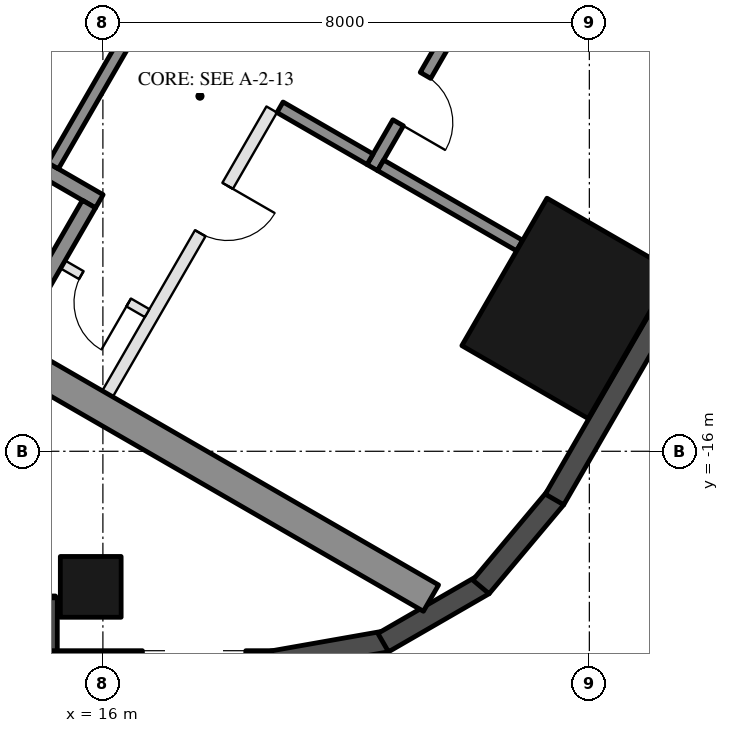
"""IFC4 building model, lengths in metres.
Left out: names, types, materials, properties, quantities, classifications, styles, units other than length and angle.
Written with IfcOpenShell. Run it as: python <this file> out.ifc"""

import sys

from ifc_helpers import new_model, si_unit, direction, frame, frame_2d, origin, origin_2d, place, context, subcontext, project, spatial, rectangle, hollow_rectangle, extrude, element, fill, save


model = new_model("IFC4")
c1 = context("Model", 3, precision=1e-05, world=origin(), true_north=direction((0.0, 1.0)))
c2 = subcontext(c1, "Body", "Model", "MODEL_VIEW")
j1 = project(units=[si_unit("LENGTHUNIT", "METRE"), si_unit("PLANEANGLEUNIT", "RADIAN")], contexts=[c1])
p1 = place(None, origin())
s1 = spatial("IfcSite", under=j1, at=p1, CompositionType="ELEMENT")
p2 = place(p1, origin())
s2 = spatial("IfcBuilding", under=s1, at=p2, CompositionType="ELEMENT")
p3 = place(p2, frame((0.0, 0.0, 68.7)))
s3 = spatial("IfcBuildingStorey", under=s2, at=p3, CompositionType="ELEMENT", Elevation=68.7)
p4 = place(p3, frame((15.8, -18.23, 0.0), z_axis=(0.0, 0.0, 1.0), x_axis=(-1.0, 0.0, 0.0)))
e1 = element("IfcColumn", 1, at=p4, inside=s3, PredefinedType="COLUMN", context=c2, shape_type="SweptSolid", body=[
    extrude(hollow_rectangle(XDim=1.0, YDim=1.0, WallThickness=0.045, at=origin_2d()), origin(), (0.0, 0.0, 1.0), 3.7),
])
p5 = place(p3, frame((23.643, -13.65, 0.0), z_axis=(0.0, 0.0, 1.0), x_axis=(0.5, 0.866025403784, 0.0)))
e2 = element("IfcColumn", 2, at=p5, inside=s3, PredefinedType="COLUMN", context=c2, shape_type="SweptSolid", body=[
    extrude(hollow_rectangle(XDim=2.8, YDim=2.4, WallThickness=0.07, at=origin_2d()), origin(), (0.0, 0.0, 1.0), 3.7),
])
p6 = place(p3, frame((8.48, -18.555, 0.0), z_axis=(0.0, 0.0, 1.0), x_axis=(1.0, 0.0, 0.0)))
e3 = element("IfcWall", 3, at=p6, inside=s3, PredefinedType="SOLIDWALL", context=c2, shape_type="SweptSolid", body=[
    extrude(rectangle(XDim=6.74, YDim=0.35, at=frame_2d((3.37, 0.0))), origin(), (0.0, 0.0, 1.0), 3.55),
])
p7 = place(p6, frame((3.57, 0.0, 0.0)))
e4 = element("IfcOpeningElement", 4, at=p7, cuts=e3, PredefinedType="OPENING", context=c2, shape_type="SweptSolid", body=[
    extrude(rectangle(XDim=2.4, YDim=2.4, at=frame_2d((1.2, 1.2))), frame((0.0, 0.185, 0.0), z_axis=(0.0, -1.0, 0.0), x_axis=(1.0, 0.0, 0.0)), (0.0, 0.0, 1.0), 0.37),
])
p8 = place(p6, frame((0.77, 0.0, 0.3)))
e5 = element("IfcOpeningElement", 5, at=p8, cuts=e3, PredefinedType="OPENING", context=c2, shape_type="SweptSolid", body=[
    extrude(rectangle(XDim=2.5, YDim=2.65, at=frame_2d((1.25, 1.325))), frame((0.0, 0.185, 0.0), z_axis=(0.0, -1.0, 0.0), x_axis=(1.0, 0.0, 0.0)), (0.0, 0.0, 1.0), 0.37),
])
p9 = place(p3, frame((15.075, -18.41, 0.0), z_axis=(0.0, 0.0, 1.0), x_axis=(0.0, -1.0, 0.0)))
e6 = element("IfcWall", 6, at=p9, inside=s3, PredefinedType="SOLIDWALL", context=c2, shape_type="SweptSolid", body=[
    extrude(rectangle(XDim=1.22, YDim=0.35, at=frame_2d((0.61, 0.0))), origin(), (0.0, 0.0, 1.0), 3.55),
])
p10 = place(p3, frame((14.9, -19.455, 0.0), z_axis=(0.0, 0.0, 1.0), x_axis=(1.0, 0.0, 0.0)))
e7 = element("IfcWall", 7, at=p10, inside=s3, PredefinedType="SOLIDWALL", context=c2, shape_type="SweptSolid", body=[
    extrude(rectangle(XDim=3.916, YDim=0.35, at=frame_2d((1.958, 0.0))), origin(), (0.0, 0.0, 1.0), 3.55),
])
p11 = place(p10, frame((1.75, 0.0, 0.3)))
e8 = element("IfcOpeningElement", 8, at=p11, cuts=e7, PredefinedType="OPENING", context=c2, shape_type="SweptSolid", body=[
    extrude(rectangle(XDim=1.7, YDim=2.65, at=frame_2d((0.85, 1.325))), frame((0.0, 0.185, 0.0), z_axis=(0.0, -1.0, 0.0), x_axis=(1.0, 0.0, 0.0)), (0.0, 0.0, 1.0), 0.37),
])
p12 = place(p3, frame((18.785, -19.458, 0.0), z_axis=(0.0, 0.0, 1.0), x_axis=(0.984798995425, 0.173697837091, 0.0)))
e9 = element("IfcWall", 9, at=p12, inside=s3, PredefinedType="SOLIDWALL", context=c2, shape_type="SweptSolid", body=[
    extrude(rectangle(XDim=1.91, YDim=0.35, at=frame_2d((0.955, 0.0))), origin(), (0.0, 0.0, 1.0), 3.55),
])
for number, where, z_axis, x_axis in (
    (10, (20.61, -19.147, 0.0), (0.0, 0.0, 1.0), (0.866, 0.5, 0.0)),
    (11, (22.217, -18.231, 0.0), (0.0, 0.0, 1.0), (0.643, 0.766, 0.0)),
):
    element("IfcWall", number, at=place(p3, frame(where, z_axis=z_axis, x_axis=x_axis)), inside=s3, PredefinedType="SOLIDWALL", context=c2, shape_type="SweptSolid", body=[
        extrude(rectangle(XDim=1.91, YDim=0.35, at=frame_2d((0.955, 0.0))), origin(), (0.0, 0.0, 1.0), 3.55),
    ])
p13 = place(p3, frame((23.427, -16.792, 0.0), z_axis=(0.0, 0.0, 1.0), x_axis=(0.500018773155, 0.866014564827, 0.0)))
e12 = element("IfcWall", 12, at=p13, inside=s3, PredefinedType="SOLIDWALL", context=c2, shape_type="SweptSolid", body=[
    extrude(rectangle(XDim=5.658, YDim=0.35, at=frame_2d((2.829, 0.0))), origin(), (0.0, 0.0, 1.0), 3.55),
])
for number, where, z_axis, x_axis in (
    (13, (8.547, -10.997, 0.0), (0.0, 0.0, 1.0), (0.866, -0.5, 0.0)),
    (14, (13.797, -1.903, 0.0), (0.0, 0.0, 1.0), (0.866, -0.5, 0.0)),
):
    element("IfcWall", number, at=place(p3, frame(where, z_axis=z_axis, x_axis=x_axis)), inside=s3, PredefinedType="SHEAR", context=c2, shape_type="SweptSolid", body=[
        extrude(rectangle(XDim=14.837, YDim=0.5, at=frame_2d((7.418, 0.0))), origin(), (0.0, 0.0, 1.0), 3.5),
    ])
p14 = place(p3, frame((10.356, -8.664, 0.0), z_axis=(0.0, 0.0, 1.0), x_axis=(0.866028629588, -0.499994412703, 0.0)))
e15 = element("IfcWall", 15, at=p14, inside=s3, PredefinedType="SHEAR", context=c2, shape_type="SweptSolid", body=[
    extrude(rectangle(XDim=6.45, YDim=0.25, at=frame_2d((3.225, 0.0))), origin(), (0.0, 0.0, 1.0), 3.5),
])
p15 = place(p14, frame((0.3, 0.0, 0.0)))
e16 = element("IfcOpeningElement", 16, at=p15, cuts=e15, PredefinedType="OPENING", context=c2, shape_type="SweptSolid", body=[
    extrude(rectangle(XDim=1.0, YDim=2.1, at=frame_2d((0.5, 1.05))), frame((0.0, 0.135, 0.0), z_axis=(0.0, -1.0, 0.0), x_axis=(1.0, 0.0, 0.0)), (0.0, 0.0, 1.0), 0.27),
])
p16 = place(p3, frame((14.496, -14.143, 0.0), z_axis=(0.0, 0.0, 1.0), x_axis=(0.500062241894, 0.865989465428, 0.0)))
e17 = element("IfcWall", 17, at=p16, inside=s3, PredefinedType="SHEAR", context=c2, shape_type="SweptSolid", body=[
    extrude(rectangle(XDim=2.55, YDim=0.25, at=frame_2d((1.275, 0.0))), origin(), (0.0, 0.0, 1.0), 3.5),
])
p17 = place(p3, frame((15.181, -11.305, 0.0), z_axis=(0.0, 0.0, 1.0), x_axis=(0.49994636267, 0.866056369097, 0.0)))
e18 = element("IfcWall", 18, at=p17, inside=s3, PredefinedType="SHEAR", context=c2, shape_type="SweptSolid", body=[
    extrude(rectangle(XDim=2.8, YDim=0.2, at=frame_2d((1.4, 0.0))), origin(), (0.0, 0.0, 1.0), 3.5),
])
p18 = place(p3, frame((20.43, -11.333, 0.0), z_axis=(0.0, 0.0, 1.0), x_axis=(0.500001309137, 0.866024647952, 0.0)))
e19 = element("IfcWall", 19, at=p18, inside=s3, PredefinedType="SHEAR", context=c2, shape_type="SweptSolid", body=[
    extrude(rectangle(XDim=2.4, YDim=0.2, at=frame_2d((1.2, 0.0))), origin(), (0.0, 0.0, 1.0), 3.5),
])
p19 = place(p18, frame((0.85, 0.0, 0.0)))
e20 = element("IfcOpeningElement", 20, at=p19, cuts=e19, PredefinedType="OPENING", context=c2, shape_type="SweptSolid", body=[
    extrude(rectangle(XDim=0.9, YDim=2.1, at=frame_2d((0.45, 1.05))), frame((0.0, 0.11, 0.0), z_axis=(0.0, -1.0, 0.0), x_axis=(1.0, 0.0, 0.0)), (0.0, 0.0, 1.0), 0.22),
])
p20 = place(p3, frame((18.913, -10.342, 0.0), z_axis=(0.0, 0.0, 1.0), x_axis=(0.866038183914, -0.499977863513, 0.0)))
e21 = element("IfcWall", 21, at=p20, inside=s3, PredefinedType="SHEAR", context=c2, shape_type="SweptSolid", body=[
    extrude(rectangle(XDim=1.71, YDim=0.2, at=frame_2d((0.855, 0.0))), origin(), (0.0, 0.0, 1.0), 3.5),
])
p21 = place(p3, frame((20.567, -11.297, 0.0), z_axis=(0.0, 0.0, 1.0), x_axis=(0.866060851709, -0.499938597367, 0.0)))
e22 = element("IfcWall", 22, at=p21, inside=s3, PredefinedType="SHEAR", context=c2, shape_type="SweptSolid", body=[
    extrude(rectangle(XDim=2.64, YDim=0.2, at=frame_2d((1.32, 0.0))), origin(), (0.0, 0.0, 1.0), 3.5),
])
p22 = place(p3, frame((16.076, -15.055, 0.0), z_axis=(0.0, 0.0, 1.0), x_axis=(0.499995103361, 0.866028230842, 0.0)))
e23 = element("IfcWall", 23, at=p22, inside=s3, PredefinedType="PARTITIONING", context=c2, shape_type="SweptSolid", body=[
    extrude(rectangle(XDim=5.4, YDim=0.2, at=frame_2d((2.7, 0.0))), origin(), (0.0, 0.0, 1.0), 3.5),
])
p23 = place(p22, frame((3.05, 0.0, 0.0)))
e24 = element("IfcOpeningElement", 24, at=p23, cuts=e23, PredefinedType="OPENING", context=c2, shape_type="SweptSolid", body=[
    extrude(rectangle(XDim=0.9, YDim=2.1, at=frame_2d((0.45, 1.05))), frame((0.0, 0.11, 0.0), z_axis=(0.0, -1.0, 0.0), x_axis=(1.0, 0.0, 0.0)), (0.0, 0.0, 1.0), 0.22),
])
p24 = place(p3, frame((15.342, -12.928, 0.0), z_axis=(0.0, 0.0, 1.0), x_axis=(0.865989903783, -0.500061482766, 0.0)))
e25 = element("IfcWall", 25, at=p24, inside=s3, PredefinedType="PARTITIONING", context=c2, shape_type="SweptSolid", body=[
    extrude(rectangle(XDim=1.6, YDim=0.15, at=frame_2d((0.8, 0.0))), origin(), (0.0, 0.0, 1.0), 3.5),
])
p25 = place(p24, frame((0.35, 0.0, 0.0)))
e26 = element("IfcOpeningElement", 26, at=p25, cuts=e25, PredefinedType="OPENING", context=c2, shape_type="SweptSolid", body=[
    extrude(rectangle(XDim=0.9, YDim=2.1, at=frame_2d((0.45, 1.05))), frame((0.0, 0.085, 0.0), z_axis=(0.0, -1.0, 0.0), x_axis=(1.0, 0.0, 0.0)), (0.0, 0.0, 1.0), 0.17),
])
p26 = place(p25, frame((0.9, 0.0, 0.0), z_axis=(0.0, 0.0, 1.0), x_axis=(-1.0, 0.0, 0.0)))
e27 = element("IfcDoor", 27, at=p26, inside=s3, OperationType="SINGLE_SWING_LEFT", PredefinedType="DOOR", context=c2, shape_type="SweptSolid", body=[
    extrude(rectangle(XDim=0.9, YDim=2.1, at=frame_2d((0.45, 1.05))), frame((0.0, 0.025, 0.0), z_axis=(0.0, -1.0, 0.0), x_axis=(1.0, 0.0, 0.0)), (0.0, 0.0, 1.0), 0.05),
])
fill(e26, e27)
p27 = place(p19, frame((0.9, 0.0, 0.0), z_axis=(0.0, 0.0, 1.0), x_axis=(-1.0, 0.0, 0.0)))
e28 = element("IfcDoor", 28, at=p27, inside=s3, OperationType="SINGLE_SWING_RIGHT", PredefinedType="DOOR", context=c2, shape_type="SweptSolid", body=[
    extrude(rectangle(XDim=0.9, YDim=2.1, at=frame_2d((0.45, 1.05))), frame((0.0, 0.025, 0.0), z_axis=(0.0, -1.0, 0.0), x_axis=(1.0, 0.0, 0.0)), (0.0, 0.0, 1.0), 0.05),
])
fill(e20, e28)
p28 = place(p23, frame((0.9, 0.0, 0.0), z_axis=(0.0, 0.0, 1.0), x_axis=(-1.0, 0.0, 0.0)))
e29 = element("IfcDoor", 29, at=p28, inside=s3, OperationType="SINGLE_SWING_LEFT", PredefinedType="DOOR", context=c2, shape_type="SweptSolid", body=[
    extrude(rectangle(XDim=0.9, YDim=2.1, at=frame_2d((0.45, 1.05))), frame((0.0, 0.025, 0.0), z_axis=(0.0, -1.0, 0.0), x_axis=(1.0, 0.0, 0.0)), (0.0, 0.0, 1.0), 0.05),
])
fill(e24, e29)
save(model, sys.argv[1])
